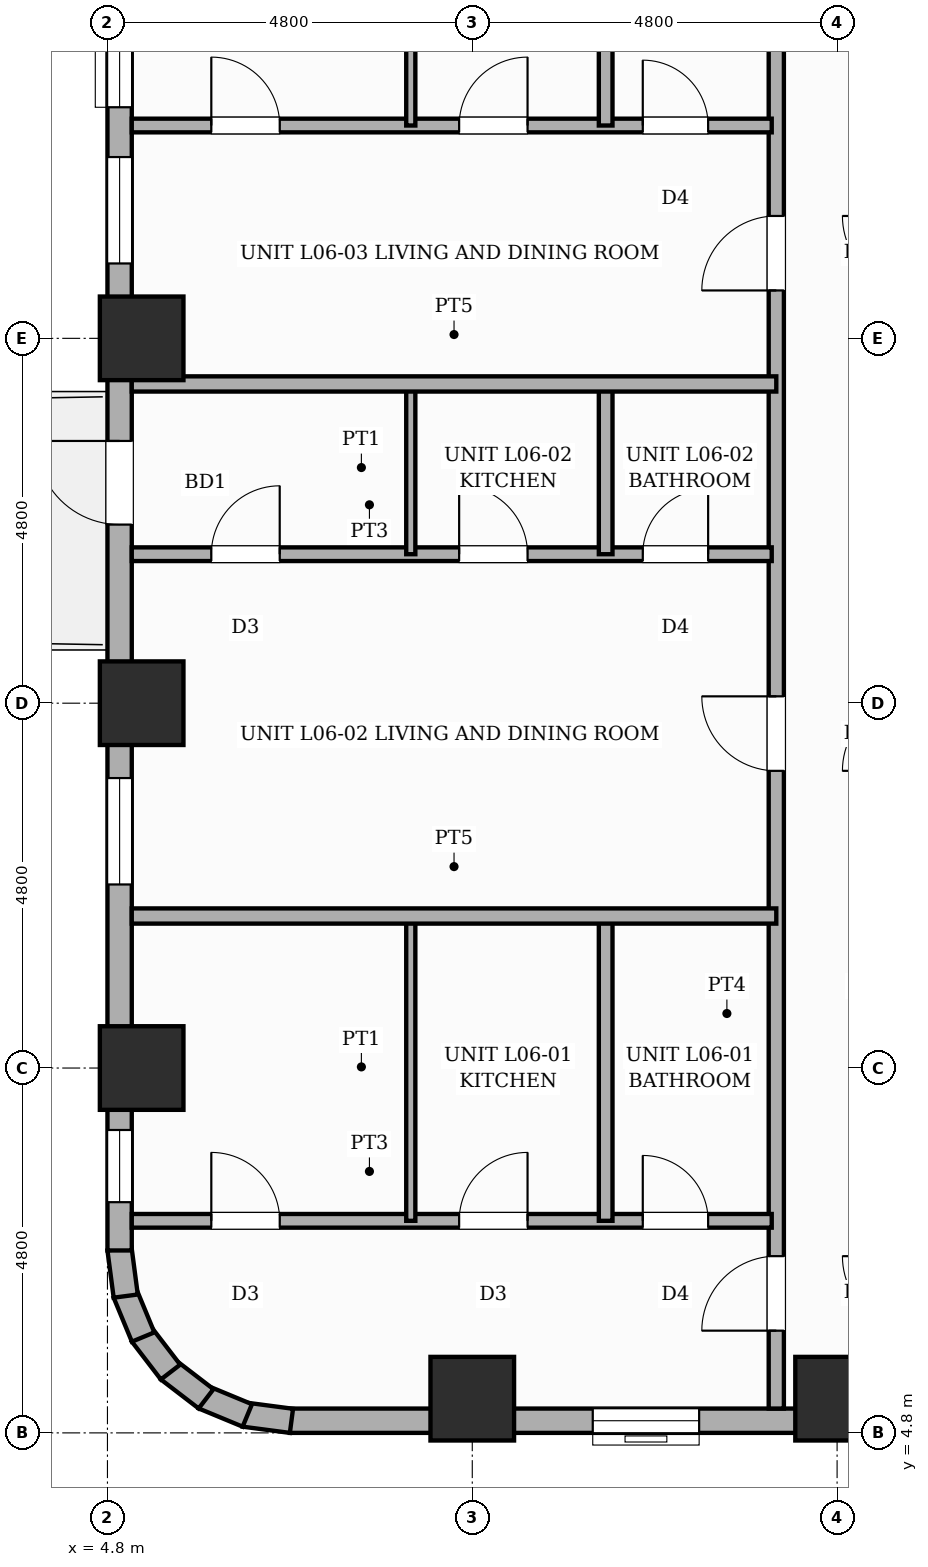
"""IFC4 building model, lengths in metres.
Left out: names, types, materials, properties, quantities, classifications, styles, units other than length and angle.
Written with IfcOpenShell. Run it as: python <this file> out.ifc"""

import sys

from ifc_helpers import new_model, si_unit, direction, frame, frame_2d, origin, origin_2d, place, context, subcontext, project, spatial, rectangle, extrude, element, fill, save


model = new_model("IFC4")
c1 = context("Model", 3, precision=1e-05, world=origin(), true_north=direction((0.0, 1.0)))
c2 = subcontext(c1, "Body", "Model", "MODEL_VIEW")
j1 = project(units=[si_unit("LENGTHUNIT", "METRE"), si_unit("PLANEANGLEUNIT", "RADIAN")], contexts=[c1])
p1 = place(None, origin())
s1 = spatial("IfcSite", under=j1, at=p1, CompositionType="ELEMENT")
p2 = place(p1, origin())
s2 = spatial("IfcBuilding", under=s1, at=p2, CompositionType="ELEMENT")
p3 = place(p2, frame((0.0, 0.0, 28.6)))
s3 = spatial("IfcBuildingStorey", under=s2, at=p3, CompositionType="ELEMENT", Elevation=28.6)
for number, where, z_axis, x_axis in (
    (1, (5.25, 9.6, 0.0), (0.0, 0.0, 1.0), (1.0, 0.0, 0.0)),
    (2, (5.25, 14.4, 0.0), (0.0, 0.0, 1.0), (1.0, 0.0, 0.0)),
    (3, (5.25, 19.2, 0.0), (0.0, 0.0, 1.0), (1.0, 0.0, 0.0)),
    (4, (9.6, 5.25, 0.0), (0.0, 0.0, 1.0), (1.0, 0.0, 0.0)),
    (5, (14.4, 5.25, 0.0), (0.0, 0.0, 1.0), (1.0, 0.0, 0.0)),
):
    element("IfcColumn", number, at=place(p3, frame(where, z_axis=z_axis, x_axis=x_axis)), inside=s3, PredefinedType="COLUMN", context=c2, shape_type="SweptSolid", body=[
        extrude(rectangle(XDim=1.1, YDim=1.1, at=origin_2d()), origin(), (0.0, 0.0, 1.0), 3.6),
    ])
p4 = place(p3, frame((21.6, 4.96, 0.0), z_axis=(0.0, 0.0, 1.0), x_axis=(-1.0, 0.0, 0.0)))
e6 = element("IfcWall", 6, at=p4, inside=s3, PredefinedType="STANDARD", context=c2, shape_type="SweptSolid", body=[
    extrude(rectangle(XDim=14.4, YDim=0.32, at=frame_2d((7.2, 0.0))), origin(), (0.0, 0.0, 1.0), 2.53),
])
p5 = place(p4, frame((9.015, 0.0, 0.65)))
e7 = element("IfcOpeningElement", 7, at=p5, cuts=e6, PredefinedType="OPENING", context=c2, shape_type="SweptSolid", body=[
    extrude(rectangle(XDim=1.4, YDim=1.1, at=frame_2d((0.7, 0.55))), frame((0.0, 0.17, 0.0), z_axis=(0.0, -1.0, 0.0), x_axis=(1.0, 0.0, 0.0)), (0.0, 0.0, 1.0), 0.34),
])
p6 = place(p4, frame((0.47, 0.0, 0.45)))
e8 = element("IfcOpeningElement", 8, at=p6, cuts=e6, PredefinedType="OPENING", context=c2, shape_type="SweptSolid", body=[
    extrude(rectangle(XDim=0.95, YDim=1.8, at=frame_2d((0.475, 0.9))), frame((0.0, 0.17, 0.0), z_axis=(0.0, -1.0, 0.0), x_axis=(1.0, 0.0, 0.0)), (0.0, 0.0, 1.0), 0.34),
])
p7 = place(p3, frame((7.221, 4.958, 0.0), z_axis=(0.0, 0.0, 1.0), x_axis=(-0.991447664465, 0.130504898859, 0.0)))
e9 = element("IfcWall", 9, at=p7, inside=s3, PredefinedType="STANDARD", context=c2, shape_type="SweptSolid", body=[
    extrude(rectangle(XDim=0.627, YDim=0.32, at=frame_2d((0.313, 0.0))), origin(), (0.0, 0.0, 1.0), 3.35),
])
p8 = place(p3, frame((6.64, 5.03, 0.0), z_axis=(0.0, 0.0, 1.0), x_axis=(-0.923836271867, 0.382787856107, 0.0)))
e10 = element("IfcWall", 10, at=p8, inside=s3, PredefinedType="STANDARD", context=c2, shape_type="SweptSolid", body=[
    extrude(rectangle(XDim=0.626, YDim=0.32, at=frame_2d((0.313, 0.0))), origin(), (0.0, 0.0, 1.0), 3.35),
])
for number, where, z_axis, x_axis in (
    (11, (6.097, 5.248, 0.0), (0.0, 0.0, 1.0), (-0.793, 0.609, 0.0)),
    (12, (5.63, 5.6, 0.0), (0.0, 0.0, 1.0), (-0.609, 0.793, 0.0)),
):
    element("IfcWall", number, at=place(p3, frame(where, z_axis=z_axis, x_axis=x_axis)), inside=s3, PredefinedType="STANDARD", context=c2, shape_type="SweptSolid", body=[
        extrude(rectangle(XDim=0.627, YDim=0.32, at=frame_2d((0.313, 0.0))), origin(), (0.0, 0.0, 1.0), 3.35),
    ])
p9 = place(p3, frame((5.269, 6.061, 0.0), z_axis=(0.0, 0.0, 1.0), x_axis=(-0.382787856107, 0.923836271867, 0.0)))
e13 = element("IfcWall", 13, at=p9, inside=s3, PredefinedType="STANDARD", context=c2, shape_type="SweptSolid", body=[
    extrude(rectangle(XDim=0.626, YDim=0.32, at=frame_2d((0.313, 0.0))), origin(), (0.0, 0.0, 1.0), 3.35),
])
p10 = place(p3, frame((5.04, 6.6, 0.0), z_axis=(0.0, 0.0, 1.0), x_axis=(-0.130504898859, 0.991447664465, 0.0)))
e14 = element("IfcWall", 14, at=p10, inside=s3, PredefinedType="STANDARD", context=c2, shape_type="SweptSolid", body=[
    extrude(rectangle(XDim=0.627, YDim=0.32, at=frame_2d((0.313, 0.0))), origin(), (0.0, 0.0, 1.0), 3.35),
])
p11 = place(p3, frame((4.96, 7.2, 0.0), z_axis=(0.0, 0.0, 1.0), x_axis=(0.0, 1.0, 0.0)))
e15 = element("IfcWall", 15, at=p11, inside=s3, PredefinedType="STANDARD", context=c2, shape_type="SweptSolid", body=[
    extrude(rectangle(XDim=38.4, YDim=0.32, at=frame_2d((19.2, 0.0))), origin(), (0.0, 0.0, 1.0), 2.53),
])
p12 = place(p11, frame((9.55, 0.0, 0.0)))
e16 = element("IfcOpeningElement", 16, at=p12, cuts=e15, PredefinedType="OPENING", context=c2, shape_type="SweptSolid", body=[
    extrude(rectangle(XDim=1.1, YDim=2.15, at=frame_2d((0.55, 1.075))), frame((0.0, 0.17, 0.0), z_axis=(0.0, -1.0, 0.0), x_axis=(1.0, 0.0, 0.0)), (0.0, 0.0, 1.0), 0.34),
])
p13 = place(p11, frame((0.635, 0.0, 0.45)))
e17 = element("IfcOpeningElement", 17, at=p13, cuts=e15, PredefinedType="OPENING", context=c2, shape_type="SweptSolid", body=[
    extrude(rectangle(XDim=0.95, YDim=1.8, at=frame_2d((0.475, 0.9))), frame((0.0, 0.17, 0.0), z_axis=(0.0, -1.0, 0.0), x_axis=(1.0, 0.0, 0.0)), (0.0, 0.0, 1.0), 0.34),
])
p14 = place(p11, frame((15.04, 0.0, 0.45)))
e18 = element("IfcOpeningElement", 18, at=p14, cuts=e15, PredefinedType="OPENING", context=c2, shape_type="SweptSolid", body=[
    extrude(rectangle(XDim=0.95, YDim=1.8, at=frame_2d((0.475, 0.9))), frame((0.0, 0.17, 0.0), z_axis=(0.0, -1.0, 0.0), x_axis=(1.0, 0.0, 0.0)), (0.0, 0.0, 1.0), 0.34),
])
p15 = place(p11, frame((4.815, 0.0, 0.65)))
e19 = element("IfcOpeningElement", 19, at=p15, cuts=e15, PredefinedType="OPENING", context=c2, shape_type="SweptSolid", body=[
    extrude(rectangle(XDim=1.4, YDim=1.1, at=frame_2d((0.7, 0.55))), frame((0.0, 0.17, 0.0), z_axis=(0.0, -1.0, 0.0), x_axis=(1.0, 0.0, 0.0)), (0.0, 0.0, 1.0), 0.34),
])
p16 = place(p11, frame((12.985, 0.0, 0.65)))
e20 = element("IfcOpeningElement", 20, at=p16, cuts=e15, PredefinedType="OPENING", context=c2, shape_type="SweptSolid", body=[
    extrude(rectangle(XDim=1.4, YDim=1.1, at=frame_2d((0.7, 0.55))), frame((0.0, 0.17, 0.0), z_axis=(0.0, -1.0, 0.0), x_axis=(1.0, 0.0, 0.0)), (0.0, 0.0, 1.0), 0.34),
])
p17 = place(p3, frame((13.6, 5.12, 0.0), z_axis=(0.0, 0.0, 1.0), x_axis=(0.0, 1.0, 0.0)))
e21 = element("IfcWall", 21, at=p17, inside=s3, PredefinedType="PARTITIONING", context=c2, shape_type="SweptSolid", body=[
    extrude(rectangle(XDim=20.63, YDim=0.2, at=frame_2d((10.315, 0.0))), origin(), (0.0, 0.0, 1.0), 3.35),
])
p18 = place(p17, frame((1.025, 0.0, 0.0)))
e22 = element("IfcOpeningElement", 22, at=p18, cuts=e21, PredefinedType="OPENING", context=c2, shape_type="SweptSolid", body=[
    extrude(rectangle(XDim=0.98, YDim=2.18, at=frame_2d((0.49, 1.09))), frame((0.0, 0.11, 0.0), z_axis=(0.0, -1.0, 0.0), x_axis=(1.0, 0.0, 0.0)), (0.0, 0.0, 1.0), 0.22),
])
p19 = place(p17, frame((8.39, 0.0, 0.0)))
e23 = element("IfcOpeningElement", 23, at=p19, cuts=e21, PredefinedType="OPENING", context=c2, shape_type="SweptSolid", body=[
    extrude(rectangle(XDim=0.98, YDim=2.18, at=frame_2d((0.49, 1.09))), frame((0.0, 0.11, 0.0), z_axis=(0.0, -1.0, 0.0), x_axis=(1.0, 0.0, 0.0)), (0.0, 0.0, 1.0), 0.22),
])
p20 = place(p17, frame((14.71, 0.0, 0.0)))
e24 = element("IfcOpeningElement", 24, at=p20, cuts=e21, PredefinedType="OPENING", context=c2, shape_type="SweptSolid", body=[
    extrude(rectangle(XDim=0.98, YDim=2.18, at=frame_2d((0.49, 1.09))), frame((0.0, 0.11, 0.0), z_axis=(0.0, -1.0, 0.0), x_axis=(1.0, 0.0, 0.0)), (0.0, 0.0, 1.0), 0.22),
])
p21 = place(p3, frame((5.12, 7.59, 0.0), z_axis=(0.0, 0.0, 1.0), x_axis=(1.0, 0.0, 0.0)))
e25 = element("IfcWall", 25, at=p21, inside=s3, PredefinedType="PLUMBINGWALL", context=c2, shape_type="SweptSolid", body=[
    extrude(rectangle(XDim=8.42, YDim=0.18, at=frame_2d((4.21, 0.0))), origin(), (0.0, 0.0, 1.0), 3.35),
])
p22 = place(p21, frame((1.046, 0.0, 0.0)))
e26 = element("IfcOpeningElement", 26, at=p22, cuts=e25, PredefinedType="OPENING", context=c2, shape_type="SweptSolid", body=[
    extrude(rectangle(XDim=0.9, YDim=2.15, at=frame_2d((0.45, 1.075))), frame((0.0, 0.1, 0.0), z_axis=(0.0, -1.0, 0.0), x_axis=(1.0, 0.0, 0.0)), (0.0, 0.0, 1.0), 0.2),
])
p23 = place(p21, frame((4.307, 0.0, 0.0)))
e27 = element("IfcOpeningElement", 27, at=p23, cuts=e25, PredefinedType="OPENING", context=c2, shape_type="SweptSolid", body=[
    extrude(rectangle(XDim=0.9, YDim=2.15, at=frame_2d((0.45, 1.075))), frame((0.0, 0.1, 0.0), z_axis=(0.0, -1.0, 0.0), x_axis=(1.0, 0.0, 0.0)), (0.0, 0.0, 1.0), 0.2),
])
p24 = place(p21, frame((6.723, 0.0, 0.0)))
e28 = element("IfcOpeningElement", 28, at=p24, cuts=e25, PredefinedType="OPENING", context=c2, shape_type="SweptSolid", body=[
    extrude(rectangle(XDim=0.86, YDim=2.1, at=frame_2d((0.43, 1.05))), frame((0.0, 0.1, 0.0), z_axis=(0.0, -1.0, 0.0), x_axis=(1.0, 0.0, 0.0)), (0.0, 0.0, 1.0), 0.2),
])
p25 = place(p3, frame((8.791, 7.59, 0.0), z_axis=(0.0, 0.0, 1.0), x_axis=(0.0, 1.0, 0.0)))
e29 = element("IfcWall", 29, at=p25, inside=s3, PredefinedType="PARTITIONING", context=c2, shape_type="SweptSolid", body=[
    extrude(rectangle(XDim=4.05, YDim=0.12, at=frame_2d((2.025, 0.0))), origin(), (0.0, 0.0, 1.0), 3.35),
])
p26 = place(p3, frame((11.355, 7.59, 0.0), z_axis=(0.0, 0.0, 1.0), x_axis=(0.0, 1.0, 0.0)))
e30 = element("IfcWall", 30, at=p26, inside=s3, PredefinedType="PLUMBINGWALL", context=c2, shape_type="SweptSolid", body=[
    extrude(rectangle(XDim=4.05, YDim=0.18, at=frame_2d((2.025, 0.0))), origin(), (0.0, 0.0, 1.0), 3.35),
])
p27 = place(p3, frame((5.12, 11.6, 0.0), z_axis=(0.0, 0.0, 1.0), x_axis=(1.0, 0.0, 0.0)))
e31 = element("IfcWall", 31, at=p27, inside=s3, PredefinedType="SOLIDWALL", context=c2, shape_type="SweptSolid", body=[
    extrude(rectangle(XDim=8.48, YDim=0.2, at=frame_2d((4.24, 0.0))), origin(), (0.0, 0.0, 1.0), 3.35),
])
p28 = place(p3, frame((5.12, 16.36, 0.0), z_axis=(0.0, 0.0, 1.0), x_axis=(1.0, 0.0, 0.0)))
e32 = element("IfcWall", 32, at=p28, inside=s3, PredefinedType="PLUMBINGWALL", context=c2, shape_type="SweptSolid", body=[
    extrude(rectangle(XDim=8.42, YDim=0.18, at=frame_2d((4.21, 0.0))), origin(), (0.0, 0.0, 1.0), 3.35),
])
p29 = place(p28, frame((1.046, 0.0, 0.0)))
e33 = element("IfcOpeningElement", 33, at=p29, cuts=e32, PredefinedType="OPENING", context=c2, shape_type="SweptSolid", body=[
    extrude(rectangle(XDim=0.9, YDim=2.15, at=frame_2d((0.45, 1.075))), frame((0.0, 0.1, 0.0), z_axis=(0.0, -1.0, 0.0), x_axis=(1.0, 0.0, 0.0)), (0.0, 0.0, 1.0), 0.2),
])
p30 = place(p28, frame((4.307, 0.0, 0.0)))
e34 = element("IfcOpeningElement", 34, at=p30, cuts=e32, PredefinedType="OPENING", context=c2, shape_type="SweptSolid", body=[
    extrude(rectangle(XDim=0.9, YDim=2.15, at=frame_2d((0.45, 1.075))), frame((0.0, 0.1, 0.0), z_axis=(0.0, -1.0, 0.0), x_axis=(1.0, 0.0, 0.0)), (0.0, 0.0, 1.0), 0.2),
])
p31 = place(p28, frame((6.723, 0.0, 0.0)))
e35 = element("IfcOpeningElement", 35, at=p31, cuts=e32, PredefinedType="OPENING", context=c2, shape_type="SweptSolid", body=[
    extrude(rectangle(XDim=0.86, YDim=2.1, at=frame_2d((0.43, 1.05))), frame((0.0, 0.1, 0.0), z_axis=(0.0, -1.0, 0.0), x_axis=(1.0, 0.0, 0.0)), (0.0, 0.0, 1.0), 0.2),
])
p32 = place(p3, frame((8.791, 16.36, 0.0), z_axis=(0.0, 0.0, 1.0), x_axis=(0.0, 1.0, 0.0)))
e36 = element("IfcWall", 36, at=p32, inside=s3, PredefinedType="PARTITIONING", context=c2, shape_type="SweptSolid", body=[
    extrude(rectangle(XDim=2.28, YDim=0.12, at=frame_2d((1.14, 0.0))), origin(), (0.0, 0.0, 1.0), 3.35),
])
p33 = place(p3, frame((11.355, 16.36, 0.0), z_axis=(0.0, 0.0, 1.0), x_axis=(0.0, 1.0, 0.0)))
e37 = element("IfcWall", 37, at=p33, inside=s3, PredefinedType="PLUMBINGWALL", context=c2, shape_type="SweptSolid", body=[
    extrude(rectangle(XDim=2.28, YDim=0.18, at=frame_2d((1.14, 0.0))), origin(), (0.0, 0.0, 1.0), 3.35),
])
p34 = place(p3, frame((5.12, 18.6, 0.0), z_axis=(0.0, 0.0, 1.0), x_axis=(1.0, 0.0, 0.0)))
e38 = element("IfcWall", 38, at=p34, inside=s3, PredefinedType="SOLIDWALL", context=c2, shape_type="SweptSolid", body=[
    extrude(rectangle(XDim=8.48, YDim=0.2, at=frame_2d((4.24, 0.0))), origin(), (0.0, 0.0, 1.0), 3.35),
])
p35 = place(p3, frame((5.12, 22.0, 0.0), z_axis=(0.0, 0.0, 1.0), x_axis=(1.0, 0.0, 0.0)))
e39 = element("IfcWall", 39, at=p35, inside=s3, PredefinedType="PLUMBINGWALL", context=c2, shape_type="SweptSolid", body=[
    extrude(rectangle(XDim=8.42, YDim=0.18, at=frame_2d((4.21, 0.0))), origin(), (0.0, 0.0, 1.0), 3.35),
])
p36 = place(p35, frame((1.046, 0.0, 0.0)))
e40 = element("IfcOpeningElement", 40, at=p36, cuts=e39, PredefinedType="OPENING", context=c2, shape_type="SweptSolid", body=[
    extrude(rectangle(XDim=0.9, YDim=2.15, at=frame_2d((0.45, 1.075))), frame((0.0, 0.1, 0.0), z_axis=(0.0, -1.0, 0.0), x_axis=(1.0, 0.0, 0.0)), (0.0, 0.0, 1.0), 0.2),
])
p37 = place(p35, frame((4.307, 0.0, 0.0)))
e41 = element("IfcOpeningElement", 41, at=p37, cuts=e39, PredefinedType="OPENING", context=c2, shape_type="SweptSolid", body=[
    extrude(rectangle(XDim=0.9, YDim=2.15, at=frame_2d((0.45, 1.075))), frame((0.0, 0.1, 0.0), z_axis=(0.0, -1.0, 0.0), x_axis=(1.0, 0.0, 0.0)), (0.0, 0.0, 1.0), 0.2),
])
p38 = place(p35, frame((6.723, 0.0, 0.0)))
e42 = element("IfcOpeningElement", 42, at=p38, cuts=e39, PredefinedType="OPENING", context=c2, shape_type="SweptSolid", body=[
    extrude(rectangle(XDim=0.86, YDim=2.1, at=frame_2d((0.43, 1.05))), frame((0.0, 0.1, 0.0), z_axis=(0.0, -1.0, 0.0), x_axis=(1.0, 0.0, 0.0)), (0.0, 0.0, 1.0), 0.2),
])
p39 = place(p3, frame((8.791, 22.0, 0.0), z_axis=(0.0, 0.0, 1.0), x_axis=(0.0, 1.0, 0.0)))
e43 = element("IfcWall", 43, at=p39, inside=s3, PredefinedType="PARTITIONING", context=c2, shape_type="SweptSolid", body=[
    extrude(rectangle(XDim=3.72, YDim=0.12, at=frame_2d((1.86, 0.0))), origin(), (0.0, 0.0, 1.0), 3.35),
])
p40 = place(p3, frame((11.355, 22.0, 0.0), z_axis=(0.0, 0.0, 1.0), x_axis=(0.0, 1.0, 0.0)))
e44 = element("IfcWall", 44, at=p40, inside=s3, PredefinedType="PLUMBINGWALL", context=c2, shape_type="SweptSolid", body=[
    extrude(rectangle(XDim=3.72, YDim=0.18, at=frame_2d((1.86, 0.0))), origin(), (0.0, 0.0, 1.0), 3.35),
])
p41 = place(p5, origin())
e45 = element("IfcWindow", 45, at=p41, inside=s3, PartitioningType="SINGLE_PANEL", PredefinedType="WINDOW", context=c2, shape_type="SweptSolid", body=[
    extrude(rectangle(XDim=1.4, YDim=1.1, at=frame_2d((0.7, 0.55))), frame((0.0, 0.03, 0.0), z_axis=(0.0, -1.0, 0.0), x_axis=(1.0, 0.0, 0.0)), (0.0, 0.0, 1.0), 0.06),
])
fill(e7, e45)
p42 = place(p12, origin())
e46 = element("IfcDoor", 46, at=p42, inside=s3, OperationType="SINGLE_SWING_RIGHT", PredefinedType="DOOR", context=c2, shape_type="SweptSolid", body=[
    extrude(rectangle(XDim=1.1, YDim=2.15, at=frame_2d((0.55, 1.075))), frame((0.0, 0.025, 0.0), z_axis=(0.0, -1.0, 0.0), x_axis=(1.0, 0.0, 0.0)), (0.0, 0.0, 1.0), 0.05),
])
fill(e16, e46)
p43 = place(p13, origin())
e47 = element("IfcWindow", 47, at=p43, inside=s3, PartitioningType="SINGLE_PANEL", PredefinedType="WINDOW", context=c2, shape_type="SweptSolid", body=[
    extrude(rectangle(XDim=0.95, YDim=1.8, at=frame_2d((0.475, 0.9))), frame((0.0, 0.03, 0.0), z_axis=(0.0, -1.0, 0.0), x_axis=(1.0, 0.0, 0.0)), (0.0, 0.0, 1.0), 0.06),
])
fill(e17, e47)
p44 = place(p14, origin())
e48 = element("IfcWindow", 48, at=p44, inside=s3, PartitioningType="SINGLE_PANEL", PredefinedType="WINDOW", context=c2, shape_type="SweptSolid", body=[
    extrude(rectangle(XDim=0.95, YDim=1.8, at=frame_2d((0.475, 0.9))), frame((0.0, 0.03, 0.0), z_axis=(0.0, -1.0, 0.0), x_axis=(1.0, 0.0, 0.0)), (0.0, 0.0, 1.0), 0.06),
])
fill(e18, e48)
p45 = place(p15, origin())
e49 = element("IfcWindow", 49, at=p45, inside=s3, PartitioningType="SINGLE_PANEL", PredefinedType="WINDOW", context=c2, shape_type="SweptSolid", body=[
    extrude(rectangle(XDim=1.4, YDim=1.1, at=frame_2d((0.7, 0.55))), frame((0.0, 0.03, 0.0), z_axis=(0.0, -1.0, 0.0), x_axis=(1.0, 0.0, 0.0)), (0.0, 0.0, 1.0), 0.06),
])
fill(e19, e49)
p46 = place(p16, origin())
e50 = element("IfcWindow", 50, at=p46, inside=s3, PartitioningType="SINGLE_PANEL", PredefinedType="WINDOW", context=c2, shape_type="SweptSolid", body=[
    extrude(rectangle(XDim=1.4, YDim=1.1, at=frame_2d((0.7, 0.55))), frame((0.0, 0.03, 0.0), z_axis=(0.0, -1.0, 0.0), x_axis=(1.0, 0.0, 0.0)), (0.0, 0.0, 1.0), 0.06),
])
fill(e20, e50)
p47 = place(p18, origin())
e51 = element("IfcDoor", 51, at=p47, inside=s3, OperationType="SINGLE_SWING_LEFT", PredefinedType="DOOR", context=c2, shape_type="SweptSolid", body=[
    extrude(rectangle(XDim=0.98, YDim=2.18, at=frame_2d((0.49, 1.09))), frame((0.0, 0.025, 0.0), z_axis=(0.0, -1.0, 0.0), x_axis=(1.0, 0.0, 0.0)), (0.0, 0.0, 1.0), 0.05),
])
fill(e22, e51)
p48 = place(p22, origin())
e52 = element("IfcDoor", 52, at=p48, inside=s3, OperationType="SINGLE_SWING_LEFT", PredefinedType="DOOR", context=c2, shape_type="SweptSolid", body=[
    extrude(rectangle(XDim=0.9, YDim=2.15, at=frame_2d((0.45, 1.075))), frame((0.0, 0.025, 0.0), z_axis=(0.0, -1.0, 0.0), x_axis=(1.0, 0.0, 0.0)), (0.0, 0.0, 1.0), 0.05),
])
fill(e26, e52)
p49 = place(p23, origin())
e53 = element("IfcDoor", 53, at=p49, inside=s3, OperationType="SINGLE_SWING_RIGHT", PredefinedType="DOOR", context=c2, shape_type="SweptSolid", body=[
    extrude(rectangle(XDim=0.9, YDim=2.15, at=frame_2d((0.45, 1.075))), frame((0.0, 0.025, 0.0), z_axis=(0.0, -1.0, 0.0), x_axis=(1.0, 0.0, 0.0)), (0.0, 0.0, 1.0), 0.05),
])
fill(e27, e53)
p50 = place(p24, origin())
e54 = element("IfcDoor", 54, at=p50, inside=s3, OperationType="SINGLE_SWING_LEFT", PredefinedType="DOOR", context=c2, shape_type="SweptSolid", body=[
    extrude(rectangle(XDim=0.86, YDim=2.1, at=frame_2d((0.43, 1.05))), frame((0.0, 0.025, 0.0), z_axis=(0.0, -1.0, 0.0), x_axis=(1.0, 0.0, 0.0)), (0.0, 0.0, 1.0), 0.05),
])
fill(e28, e54)
p51 = place(p19, origin())
e55 = element("IfcDoor", 55, at=p51, inside=s3, OperationType="SINGLE_SWING_RIGHT", PredefinedType="DOOR", context=c2, shape_type="SweptSolid", body=[
    extrude(rectangle(XDim=0.98, YDim=2.18, at=frame_2d((0.49, 1.09))), frame((0.0, 0.025, 0.0), z_axis=(0.0, -1.0, 0.0), x_axis=(1.0, 0.0, 0.0)), (0.0, 0.0, 1.0), 0.05),
])
fill(e23, e55)
p52 = place(p29, origin())
e56 = element("IfcDoor", 56, at=p52, inside=s3, OperationType="SINGLE_SWING_RIGHT", PredefinedType="DOOR", context=c2, shape_type="SweptSolid", body=[
    extrude(rectangle(XDim=0.9, YDim=2.15, at=frame_2d((0.45, 1.075))), frame((0.0, 0.025, 0.0), z_axis=(0.0, -1.0, 0.0), x_axis=(1.0, 0.0, 0.0)), (0.0, 0.0, 1.0), 0.05),
])
fill(e33, e56)
p53 = place(p30, origin())
e57 = element("IfcDoor", 57, at=p53, inside=s3, OperationType="SINGLE_SWING_LEFT", PredefinedType="DOOR", context=c2, shape_type="SweptSolid", body=[
    extrude(rectangle(XDim=0.9, YDim=2.15, at=frame_2d((0.45, 1.075))), frame((0.0, 0.025, 0.0), z_axis=(0.0, -1.0, 0.0), x_axis=(1.0, 0.0, 0.0)), (0.0, 0.0, 1.0), 0.05),
])
fill(e34, e57)
p54 = place(p31, origin())
e58 = element("IfcDoor", 58, at=p54, inside=s3, OperationType="SINGLE_SWING_RIGHT", PredefinedType="DOOR", context=c2, shape_type="SweptSolid", body=[
    extrude(rectangle(XDim=0.86, YDim=2.1, at=frame_2d((0.43, 1.05))), frame((0.0, 0.025, 0.0), z_axis=(0.0, -1.0, 0.0), x_axis=(1.0, 0.0, 0.0)), (0.0, 0.0, 1.0), 0.05),
])
fill(e35, e58)
p55 = place(p20, origin())
e59 = element("IfcDoor", 59, at=p55, inside=s3, OperationType="SINGLE_SWING_LEFT", PredefinedType="DOOR", context=c2, shape_type="SweptSolid", body=[
    extrude(rectangle(XDim=0.98, YDim=2.18, at=frame_2d((0.49, 1.09))), frame((0.0, 0.025, 0.0), z_axis=(0.0, -1.0, 0.0), x_axis=(1.0, 0.0, 0.0)), (0.0, 0.0, 1.0), 0.05),
])
fill(e24, e59)
p56 = place(p36, origin())
e60 = element("IfcDoor", 60, at=p56, inside=s3, OperationType="SINGLE_SWING_LEFT", PredefinedType="DOOR", context=c2, shape_type="SweptSolid", body=[
    extrude(rectangle(XDim=0.9, YDim=2.15, at=frame_2d((0.45, 1.075))), frame((0.0, 0.025, 0.0), z_axis=(0.0, -1.0, 0.0), x_axis=(1.0, 0.0, 0.0)), (0.0, 0.0, 1.0), 0.05),
])
fill(e40, e60)
p57 = place(p37, origin())
e61 = element("IfcDoor", 61, at=p57, inside=s3, OperationType="SINGLE_SWING_RIGHT", PredefinedType="DOOR", context=c2, shape_type="SweptSolid", body=[
    extrude(rectangle(XDim=0.9, YDim=2.15, at=frame_2d((0.45, 1.075))), frame((0.0, 0.025, 0.0), z_axis=(0.0, -1.0, 0.0), x_axis=(1.0, 0.0, 0.0)), (0.0, 0.0, 1.0), 0.05),
])
fill(e41, e61)
p58 = place(p38, origin())
e62 = element("IfcDoor", 62, at=p58, inside=s3, OperationType="SINGLE_SWING_LEFT", PredefinedType="DOOR", context=c2, shape_type="SweptSolid", body=[
    extrude(rectangle(XDim=0.86, YDim=2.1, at=frame_2d((0.43, 1.05))), frame((0.0, 0.025, 0.0), z_axis=(0.0, -1.0, 0.0), x_axis=(1.0, 0.0, 0.0)), (0.0, 0.0, 1.0), 0.05),
])
fill(e42, e62)
save(model, sys.argv[1])
